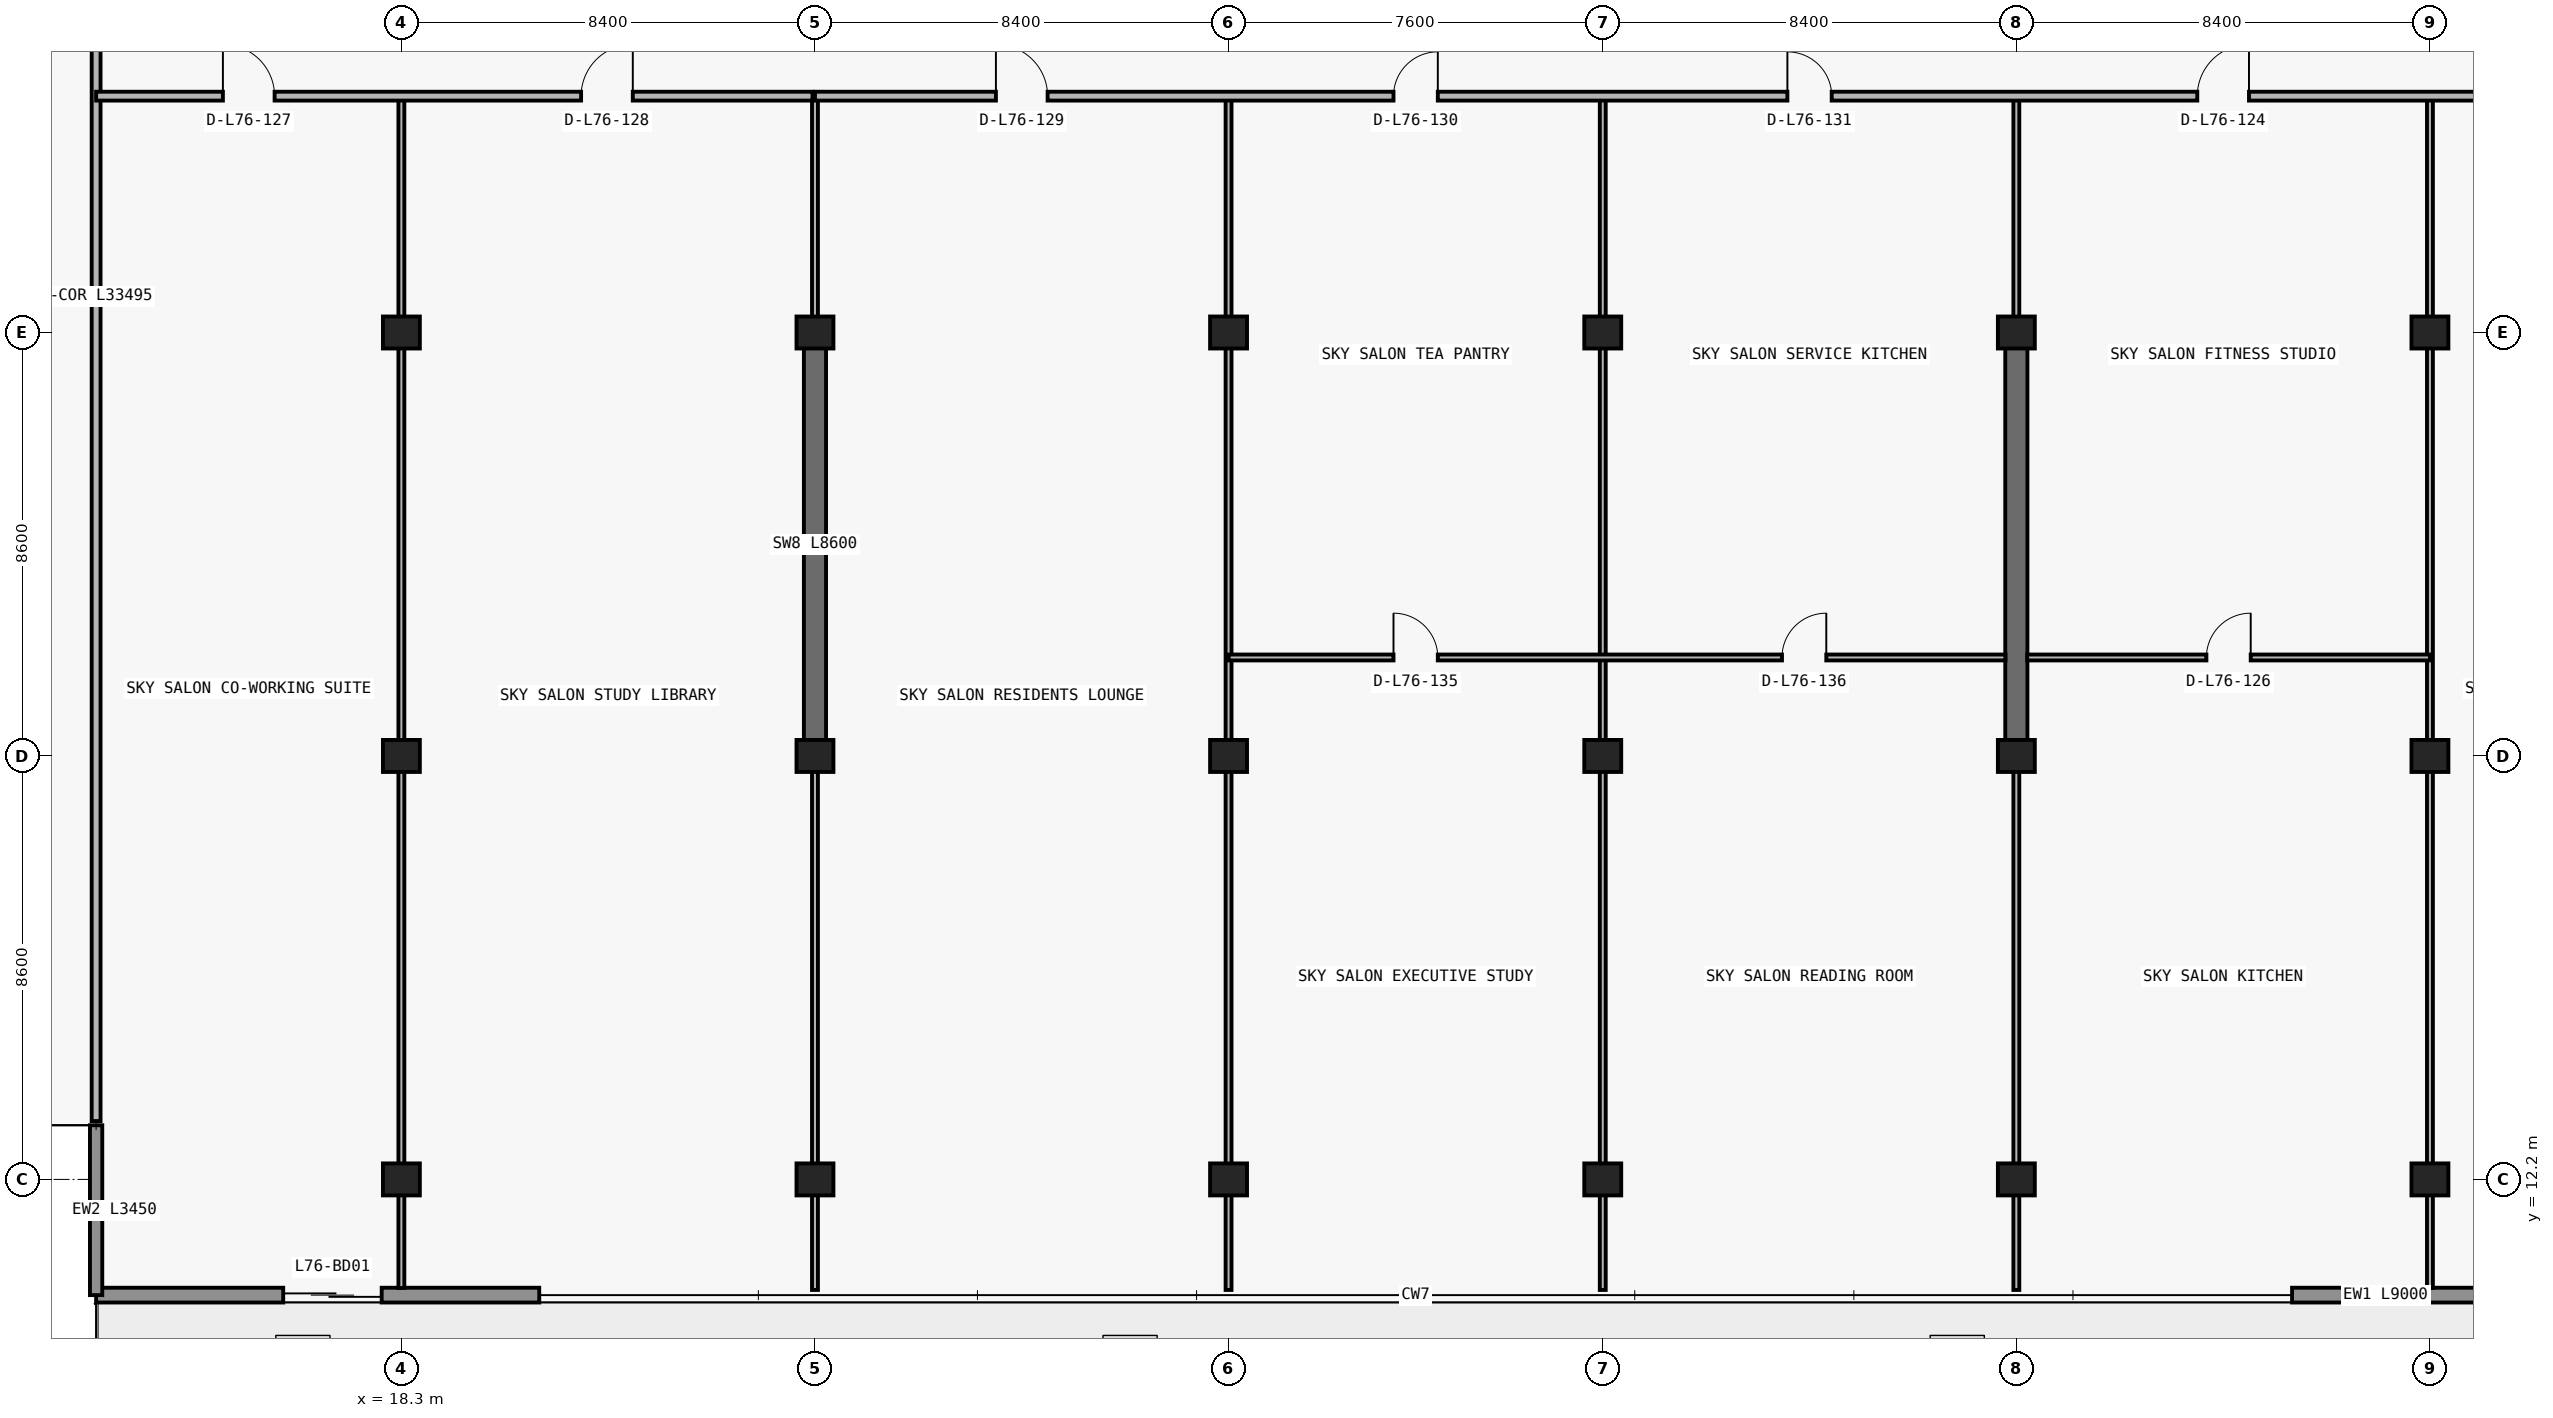
"""IFC4 building model, lengths in metres.
Left out: names, types, materials, properties, quantities, classifications, styles, units other than length and angle.
Written with IfcOpenShell. Run it as: python <this file> out.ifc"""

import sys

from ifc_helpers import new_model, si_unit, direction, frame, frame_2d, origin, origin_2d, place, context, subcontext, project, spatial, rectangle, extrude, element, fill, save


model = new_model("IFC4")
c1 = context("Model", 3, precision=1e-05, world=origin(), true_north=direction((0.0, 1.0)))
c2 = subcontext(c1, "Body", "Model", "MODEL_VIEW")
j1 = project(units=[si_unit("LENGTHUNIT", "METRE"), si_unit("PLANEANGLEUNIT", "RADIAN")], contexts=[c1])
p1 = place(None, origin())
s1 = spatial("IfcSite", under=j1, at=p1, CompositionType="ELEMENT")
p2 = place(p1, origin())
s2 = spatial("IfcBuilding", under=s1, at=p2, CompositionType="ELEMENT")
p3 = place(p2, frame((0.0, 0.0, 269.4)))
s3 = spatial("IfcBuildingStorey", under=s2, at=p3, CompositionType="ELEMENT", Elevation=269.4)
for number, where, z_axis, x_axis in (
    (1, (18.3, 12.2, 0.0), (0.0, 0.0, 1.0), (1.0, 0.0, 0.0)),
    (2, (26.7, 12.2, 0.0), (0.0, 0.0, 1.0), (1.0, 0.0, 0.0)),
    (3, (35.1, 12.2, 0.0), (0.0, 0.0, 1.0), (1.0, 0.0, 0.0)),
    (4, (42.7, 12.2, 0.0), (0.0, 0.0, 1.0), (1.0, 0.0, 0.0)),
    (5, (51.1, 12.2, 0.0), (0.0, 0.0, 1.0), (1.0, 0.0, 0.0)),
    (6, (59.5, 12.2, 0.0), (0.0, 0.0, 1.0), (1.0, 0.0, 0.0)),
    (7, (18.3, 20.8, 0.0), (0.0, 0.0, 1.0), (1.0, 0.0, 0.0)),
    (8, (26.7, 20.8, 0.0), (0.0, 0.0, 1.0), (1.0, 0.0, 0.0)),
    (9, (35.1, 20.8, 0.0), (0.0, 0.0, 1.0), (1.0, 0.0, 0.0)),
    (10, (42.7, 20.8, 0.0), (0.0, 0.0, 1.0), (1.0, 0.0, 0.0)),
    (11, (51.1, 20.8, 0.0), (0.0, 0.0, 1.0), (1.0, 0.0, 0.0)),
    (12, (59.5, 20.8, 0.0), (0.0, 0.0, 1.0), (1.0, 0.0, 0.0)),
    (13, (18.3, 29.4, 0.0), (0.0, 0.0, 1.0), (1.0, 0.0, 0.0)),
    (14, (26.7, 29.4, 0.0), (0.0, 0.0, 1.0), (1.0, 0.0, 0.0)),
    (15, (35.1, 29.4, 0.0), (0.0, 0.0, 1.0), (1.0, 0.0, 0.0)),
    (16, (42.7, 29.4, 0.0), (0.0, 0.0, 1.0), (1.0, 0.0, 0.0)),
    (17, (51.1, 29.4, 0.0), (0.0, 0.0, 1.0), (1.0, 0.0, 0.0)),
    (18, (59.5, 29.4, 0.0), (0.0, 0.0, 1.0), (1.0, 0.0, 0.0)),
):
    element("IfcColumn", number, at=place(p3, frame(where, z_axis=z_axis, x_axis=x_axis)), inside=s3, PredefinedType="COLUMN", context=c2, shape_type="SweptSolid", body=[
        extrude(rectangle(XDim=0.75, YDim=0.65, at=origin_2d()), origin(), (0.0, 0.0, 1.0), 4.5),
    ])
for number, where, z_axis, x_axis in (
    (19, (26.7, 20.8, 0.0), (0.0, 0.0, 1.0), (0.0, 1.0, 0.0)),
    (20, (51.1, 20.8, 0.0), (0.0, 0.0, 1.0), (0.0, 1.0, 0.0)),
):
    element("IfcWall", number, at=place(p3, frame(where, z_axis=z_axis, x_axis=x_axis)), inside=s3, PredefinedType="SHEAR", context=c2, shape_type="SweptSolid", body=[
        extrude(rectangle(XDim=8.6, YDim=0.45, at=frame_2d((4.3, 0.0))), origin(), (0.0, 0.0, 1.0), 4.5),
    ])
p4 = place(p3, frame((65.7, 9.85, 0.0), z_axis=(0.0, 0.0, 1.0), x_axis=(-1.0, 0.0, 0.0)))
e21 = element("IfcWall", 21, at=p4, inside=s3, PredefinedType="STANDARD", context=c2, shape_type="SweptSolid", body=[
    extrude(rectangle(XDim=9.0, YDim=0.3, at=frame_2d((4.5, 0.0))), origin(), (0.0, 0.0, 1.0), 4.5),
])
p5 = place(p4, frame((3.2, 0.0, 0.0)))
e22 = element("IfcOpeningElement", 22, at=p5, cuts=e21, PredefinedType="OPENING", context=c2, shape_type="SweptSolid", body=[
    extrude(rectangle(XDim=2.0, YDim=2.3, at=frame_2d((1.0, 1.15))), frame((0.0, 0.16, 0.0), z_axis=(0.0, -1.0, 0.0), x_axis=(1.0, 0.0, 0.0)), (0.0, 0.0, 1.0), 0.32),
])
p6 = place(p3, frame((21.1, 9.85, 0.0), z_axis=(0.0, 0.0, 1.0), x_axis=(-1.0, 0.0, 0.0)))
e23 = element("IfcWall", 23, at=p6, inside=s3, PredefinedType="STANDARD", context=c2, shape_type="SweptSolid", body=[
    extrude(rectangle(XDim=9.0, YDim=0.3, at=frame_2d((4.5, 0.0))), origin(), (0.0, 0.0, 1.0), 4.5),
])
p7 = place(p6, frame((3.2, 0.0, 0.0)))
e24 = element("IfcOpeningElement", 24, at=p7, cuts=e23, PredefinedType="OPENING", context=c2, shape_type="SweptSolid", body=[
    extrude(rectangle(XDim=2.0, YDim=2.3, at=frame_2d((1.0, 1.15))), frame((0.0, 0.16, 0.0), z_axis=(0.0, -1.0, 0.0), x_axis=(1.0, 0.0, 0.0)), (0.0, 0.0, 1.0), 0.32),
])
p8 = place(p3, frame((12.1, 13.3, 0.0), z_axis=(0.0, 0.0, 1.0), x_axis=(0.0, -1.0, 0.0)))
e25 = element("IfcWall", 25, at=p8, inside=s3, PredefinedType="ELEMENTEDWALL", context=c2, shape_type="SweptSolid", body=[
    extrude(rectangle(XDim=3.45, YDim=0.25, at=frame_2d((1.725, 0.0))), origin(), (0.0, 0.0, 1.0), 4.5),
])
p9 = place(p3, frame((12.1, 13.385, 0.0), z_axis=(0.0, 0.0, 1.0), x_axis=(0.0, 1.0, 0.0)))
e26 = element("IfcWall", 26, at=p9, inside=s3, PredefinedType="PARTITIONING", context=c2, shape_type="SweptSolid", body=[
    extrude(rectangle(XDim=33.495, YDim=0.18, at=frame_2d((16.748, 0.0))), origin(), (0.0, 0.0, 1.0), 4.5),
])
p10 = place(p3, frame((18.3, 9.995, 0.0), z_axis=(0.0, 0.0, 1.0), x_axis=(0.0, 1.0, 0.0)))
e27 = element("IfcWall", 27, at=p10, inside=s3, PredefinedType="PARTITIONING", context=c2, shape_type="SweptSolid", body=[
    extrude(rectangle(XDim=24.205, YDim=0.12, at=frame_2d((12.103, 0.0))), origin(), (0.0, 0.0, 1.0), 3.464),
])
p11 = place(p3, frame((26.7, 9.955, 0.0), z_axis=(0.0, 0.0, 1.0), x_axis=(0.0, 1.0, 0.0)))
e28 = element("IfcWall", 28, at=p11, inside=s3, PredefinedType="PARTITIONING", context=c2, shape_type="SweptSolid", body=[
    extrude(rectangle(XDim=10.84, YDim=0.12, at=frame_2d((5.42, 0.0))), origin(), (0.0, 0.0, 1.0), 4.5),
])
p12 = place(p3, frame((26.7, 29.405, 0.0), z_axis=(0.0, 0.0, 1.0), x_axis=(0.0, 1.0, 0.0)))
e29 = element("IfcWall", 29, at=p12, inside=s3, PredefinedType="PARTITIONING", context=c2, shape_type="SweptSolid", body=[
    extrude(rectangle(XDim=4.795, YDim=0.12, at=frame_2d((2.397, 0.0))), origin(), (0.0, 0.0, 1.0), 3.785),
])
for number, where, z_axis, x_axis in (
    (30, (35.1, 9.955, 0.0), (0.0, 0.0, 1.0), (0.0, 1.0, 0.0)),
    (31, (42.7, 9.955, 0.0), (0.0, 0.0, 1.0), (0.0, 1.0, 0.0)),
):
    element("IfcWall", number, at=place(p3, frame(where, z_axis=z_axis, x_axis=x_axis)), inside=s3, PredefinedType="PARTITIONING", context=c2, shape_type="SweptSolid", body=[
        extrude(rectangle(XDim=24.245, YDim=0.12, at=frame_2d((12.123, 0.0))), origin(), (0.0, 0.0, 1.0), 3.464),
    ])
p13 = place(p3, frame((51.1, 9.955, 0.0), z_axis=(0.0, 0.0, 1.0), x_axis=(0.0, 1.0, 0.0)))
e32 = element("IfcWall", 32, at=p13, inside=s3, PredefinedType="PARTITIONING", context=c2, shape_type="SweptSolid", body=[
    extrude(rectangle(XDim=10.84, YDim=0.12, at=frame_2d((5.42, 0.0))), origin(), (0.0, 0.0, 1.0), 4.5),
])
p14 = place(p3, frame((51.1, 29.405, 0.0), z_axis=(0.0, 0.0, 1.0), x_axis=(0.0, 1.0, 0.0)))
e33 = element("IfcWall", 33, at=p14, inside=s3, PredefinedType="PARTITIONING", context=c2, shape_type="SweptSolid", body=[
    extrude(rectangle(XDim=4.795, YDim=0.12, at=frame_2d((2.397, 0.0))), origin(), (0.0, 0.0, 1.0), 3.785),
])
p15 = place(p3, frame((59.5, 9.995, 0.0), z_axis=(0.0, 0.0, 1.0), x_axis=(0.0, 1.0, 0.0)))
e34 = element("IfcWall", 34, at=p15, inside=s3, PredefinedType="PARTITIONING", context=c2, shape_type="SweptSolid", body=[
    extrude(rectangle(XDim=24.205, YDim=0.12, at=frame_2d((12.103, 0.0))), origin(), (0.0, 0.0, 1.0), 3.464),
])
p16 = place(p3, frame((35.1, 22.8, 0.0), z_axis=(0.0, 0.0, 1.0), x_axis=(1.0, 0.0, 0.0)))
e35 = element("IfcWall", 35, at=p16, inside=s3, PredefinedType="PARTITIONING", context=c2, shape_type="SweptSolid", body=[
    extrude(rectangle(XDim=15.78, YDim=0.12, at=frame_2d((7.89, 0.0))), origin(), (0.0, 0.0, 1.0), 4.5),
])
p17 = place(p16, frame((3.35, 0.0, 0.0)))
e36 = element("IfcOpeningElement", 36, at=p17, cuts=e35, PredefinedType="OPENING", context=c2, shape_type="SweptSolid", body=[
    extrude(rectangle(XDim=0.9, YDim=2.15, at=frame_2d((0.45, 1.075))), frame((0.0, 0.07, 0.0), z_axis=(0.0, -1.0, 0.0), x_axis=(1.0, 0.0, 0.0)), (0.0, 0.0, 1.0), 0.14),
])
p18 = place(p16, frame((11.24, 0.0, 0.0)))
e37 = element("IfcOpeningElement", 37, at=p18, cuts=e35, PredefinedType="OPENING", context=c2, shape_type="SweptSolid", body=[
    extrude(rectangle(XDim=0.9, YDim=2.15, at=frame_2d((0.45, 1.075))), frame((0.0, 0.07, 0.0), z_axis=(0.0, -1.0, 0.0), x_axis=(1.0, 0.0, 0.0)), (0.0, 0.0, 1.0), 0.14),
])
p19 = place(p3, frame((51.32, 22.8, 0.0), z_axis=(0.0, 0.0, 1.0), x_axis=(1.0, 0.0, 0.0)))
e38 = element("IfcWall", 38, at=p19, inside=s3, PredefinedType="PARTITIONING", context=c2, shape_type="SweptSolid", body=[
    extrude(rectangle(XDim=8.18, YDim=0.12, at=frame_2d((4.09, 0.0))), origin(), (0.0, 0.0, 1.0), 4.5),
])
p20 = place(p19, frame((3.64, 0.0, 0.0)))
e39 = element("IfcOpeningElement", 39, at=p20, cuts=e38, PredefinedType="OPENING", context=c2, shape_type="SweptSolid", body=[
    extrude(rectangle(XDim=0.9, YDim=2.15, at=frame_2d((0.45, 1.075))), frame((0.0, 0.07, 0.0), z_axis=(0.0, -1.0, 0.0), x_axis=(1.0, 0.0, 0.0)), (0.0, 0.0, 1.0), 0.14),
])
p21 = place(p3, frame((12.1, 34.2, 0.0), z_axis=(0.0, 0.0, 1.0), x_axis=(1.0, 0.0, 0.0)))
e40 = element("IfcWall", 40, at=p21, inside=s3, PredefinedType="PARTITIONING", context=c2, shape_type="SweptSolid", body=[
    extrude(rectangle(XDim=14.55, YDim=0.18, at=frame_2d((7.275, 0.0))), origin(), (0.0, 0.0, 1.0), 4.5),
])
p22 = place(p21, frame((2.575, 0.0, 0.0)))
e41 = element("IfcOpeningElement", 41, at=p22, cuts=e40, PredefinedType="OPENING", context=c2, shape_type="SweptSolid", body=[
    extrude(rectangle(XDim=1.05, YDim=2.15, at=frame_2d((0.525, 1.075))), frame((0.0, 0.1, 0.0), z_axis=(0.0, -1.0, 0.0), x_axis=(1.0, 0.0, 0.0)), (0.0, 0.0, 1.0), 0.2),
])
p23 = place(p21, frame((9.85, 0.0, 0.0)))
e42 = element("IfcOpeningElement", 42, at=p23, cuts=e40, PredefinedType="OPENING", context=c2, shape_type="SweptSolid", body=[
    extrude(rectangle(XDim=1.05, YDim=2.15, at=frame_2d((0.525, 1.075))), frame((0.0, 0.1, 0.0), z_axis=(0.0, -1.0, 0.0), x_axis=(1.0, 0.0, 0.0)), (0.0, 0.0, 1.0), 0.2),
])
p24 = place(p3, frame((26.7, 34.2, 0.0), z_axis=(0.0, 0.0, 1.0), x_axis=(1.0, 0.0, 0.0)))
e43 = element("IfcWall", 43, at=p24, inside=s3, PredefinedType="PARTITIONING", context=c2, shape_type="SweptSolid", body=[
    extrude(rectangle(XDim=39.0, YDim=0.18, at=frame_2d((19.5, 0.0))), origin(), (0.0, 0.0, 1.0), 4.5),
])
p25 = place(p24, frame((28.075, 0.0, 0.0)))
e44 = element("IfcOpeningElement", 44, at=p25, cuts=e43, PredefinedType="OPENING", context=c2, shape_type="SweptSolid", body=[
    extrude(rectangle(XDim=1.05, YDim=2.15, at=frame_2d((0.525, 1.075))), frame((0.0, 0.1, 0.0), z_axis=(0.0, -1.0, 0.0), x_axis=(1.0, 0.0, 0.0)), (0.0, 0.0, 1.0), 0.2),
])
p26 = place(p24, frame((35.375, 0.0, 0.0)))
e45 = element("IfcOpeningElement", 45, at=p26, cuts=e43, PredefinedType="OPENING", context=c2, shape_type="SweptSolid", body=[
    extrude(rectangle(XDim=1.05, YDim=2.15, at=frame_2d((0.525, 1.075))), frame((0.0, 0.1, 0.0), z_axis=(0.0, -1.0, 0.0), x_axis=(1.0, 0.0, 0.0)), (0.0, 0.0, 1.0), 0.2),
])
p27 = place(p24, frame((3.675, 0.0, 0.0)))
e46 = element("IfcOpeningElement", 46, at=p27, cuts=e43, PredefinedType="OPENING", context=c2, shape_type="SweptSolid", body=[
    extrude(rectangle(XDim=1.05, YDim=2.15, at=frame_2d((0.525, 1.075))), frame((0.0, 0.1, 0.0), z_axis=(0.0, -1.0, 0.0), x_axis=(1.0, 0.0, 0.0)), (0.0, 0.0, 1.0), 0.2),
])
p28 = place(p24, frame((11.75, 0.0, 0.0)))
e47 = element("IfcOpeningElement", 47, at=p28, cuts=e43, PredefinedType="OPENING", context=c2, shape_type="SweptSolid", body=[
    extrude(rectangle(XDim=0.9, YDim=2.15, at=frame_2d((0.45, 1.075))), frame((0.0, 0.1, 0.0), z_axis=(0.0, -1.0, 0.0), x_axis=(1.0, 0.0, 0.0)), (0.0, 0.0, 1.0), 0.2),
])
p29 = place(p24, frame((19.75, 0.0, 0.0)))
e48 = element("IfcOpeningElement", 48, at=p29, cuts=e43, PredefinedType="OPENING", context=c2, shape_type="SweptSolid", body=[
    extrude(rectangle(XDim=0.9, YDim=2.15, at=frame_2d((0.45, 1.075))), frame((0.0, 0.1, 0.0), z_axis=(0.0, -1.0, 0.0), x_axis=(1.0, 0.0, 0.0)), (0.0, 0.0, 1.0), 0.2),
])
p30 = place(p7, origin())
e49 = element("IfcDoor", 49, at=p30, inside=s3, OperationType="DOUBLE_DOOR_SLIDING", PredefinedType="DOOR", context=c2, shape_type="SweptSolid", body=[
    extrude(rectangle(XDim=2.0, YDim=2.3, at=frame_2d((1.0, 1.15))), frame((0.0, 0.025, 0.0), z_axis=(0.0, -1.0, 0.0), x_axis=(1.0, 0.0, 0.0)), (0.0, 0.0, 1.0), 0.05),
])
fill(e24, e49)
p31 = place(p25, origin())
e50 = element("IfcDoor", 50, at=p31, inside=s3, OperationType="SINGLE_SWING_RIGHT", PredefinedType="DOOR", context=c2, shape_type="SweptSolid", body=[
    extrude(rectangle(XDim=1.05, YDim=2.15, at=frame_2d((0.525, 1.075))), frame((0.0, 0.025, 0.0), z_axis=(0.0, -1.0, 0.0), x_axis=(1.0, 0.0, 0.0)), (0.0, 0.0, 1.0), 0.05),
])
fill(e44, e50)
p32 = place(p20, origin())
e51 = element("IfcDoor", 51, at=p32, inside=s3, OperationType="SINGLE_SWING_RIGHT", PredefinedType="DOOR", context=c2, shape_type="SweptSolid", body=[
    extrude(rectangle(XDim=0.9, YDim=2.15, at=frame_2d((0.45, 1.075))), frame((0.0, 0.025, 0.0), z_axis=(0.0, -1.0, 0.0), x_axis=(1.0, 0.0, 0.0)), (0.0, 0.0, 1.0), 0.05),
])
fill(e39, e51)
p33 = place(p22, origin())
e52 = element("IfcDoor", 52, at=p33, inside=s3, OperationType="SINGLE_SWING_LEFT", PredefinedType="DOOR", context=c2, shape_type="SweptSolid", body=[
    extrude(rectangle(XDim=1.05, YDim=2.15, at=frame_2d((0.525, 1.075))), frame((0.0, 0.025, 0.0), z_axis=(0.0, -1.0, 0.0), x_axis=(1.0, 0.0, 0.0)), (0.0, 0.0, 1.0), 0.05),
])
fill(e41, e52)
p34 = place(p23, origin())
e53 = element("IfcDoor", 53, at=p34, inside=s3, OperationType="SINGLE_SWING_RIGHT", PredefinedType="DOOR", context=c2, shape_type="SweptSolid", body=[
    extrude(rectangle(XDim=1.05, YDim=2.15, at=frame_2d((0.525, 1.075))), frame((0.0, 0.025, 0.0), z_axis=(0.0, -1.0, 0.0), x_axis=(1.0, 0.0, 0.0)), (0.0, 0.0, 1.0), 0.05),
])
fill(e42, e53)
p35 = place(p27, origin())
e54 = element("IfcDoor", 54, at=p35, inside=s3, OperationType="SINGLE_SWING_LEFT", PredefinedType="DOOR", context=c2, shape_type="SweptSolid", body=[
    extrude(rectangle(XDim=1.05, YDim=2.15, at=frame_2d((0.525, 1.075))), frame((0.0, 0.025, 0.0), z_axis=(0.0, -1.0, 0.0), x_axis=(1.0, 0.0, 0.0)), (0.0, 0.0, 1.0), 0.05),
])
fill(e46, e54)
p36 = place(p28, origin())
e55 = element("IfcDoor", 55, at=p36, inside=s3, OperationType="SINGLE_SWING_RIGHT", PredefinedType="DOOR", context=c2, shape_type="SweptSolid", body=[
    extrude(rectangle(XDim=0.9, YDim=2.15, at=frame_2d((0.45, 1.075))), frame((0.0, 0.025, 0.0), z_axis=(0.0, -1.0, 0.0), x_axis=(1.0, 0.0, 0.0)), (0.0, 0.0, 1.0), 0.05),
])
fill(e47, e55)
p37 = place(p29, origin())
e56 = element("IfcDoor", 56, at=p37, inside=s3, OperationType="SINGLE_SWING_LEFT", PredefinedType="DOOR", context=c2, shape_type="SweptSolid", body=[
    extrude(rectangle(XDim=0.9, YDim=2.15, at=frame_2d((0.45, 1.075))), frame((0.0, 0.025, 0.0), z_axis=(0.0, -1.0, 0.0), x_axis=(1.0, 0.0, 0.0)), (0.0, 0.0, 1.0), 0.05),
])
fill(e48, e56)
p38 = place(p17, origin())
e57 = element("IfcDoor", 57, at=p38, inside=s3, OperationType="SINGLE_SWING_LEFT", PredefinedType="DOOR", context=c2, shape_type="SweptSolid", body=[
    extrude(rectangle(XDim=0.9, YDim=2.15, at=frame_2d((0.45, 1.075))), frame((0.0, 0.025, 0.0), z_axis=(0.0, -1.0, 0.0), x_axis=(1.0, 0.0, 0.0)), (0.0, 0.0, 1.0), 0.05),
])
fill(e36, e57)
p39 = place(p18, origin())
e58 = element("IfcDoor", 58, at=p39, inside=s3, OperationType="SINGLE_SWING_RIGHT", PredefinedType="DOOR", context=c2, shape_type="SweptSolid", body=[
    extrude(rectangle(XDim=0.9, YDim=2.15, at=frame_2d((0.45, 1.075))), frame((0.0, 0.025, 0.0), z_axis=(0.0, -1.0, 0.0), x_axis=(1.0, 0.0, 0.0)), (0.0, 0.0, 1.0), 0.05),
])
fill(e37, e58)
save(model, sys.argv[1])
